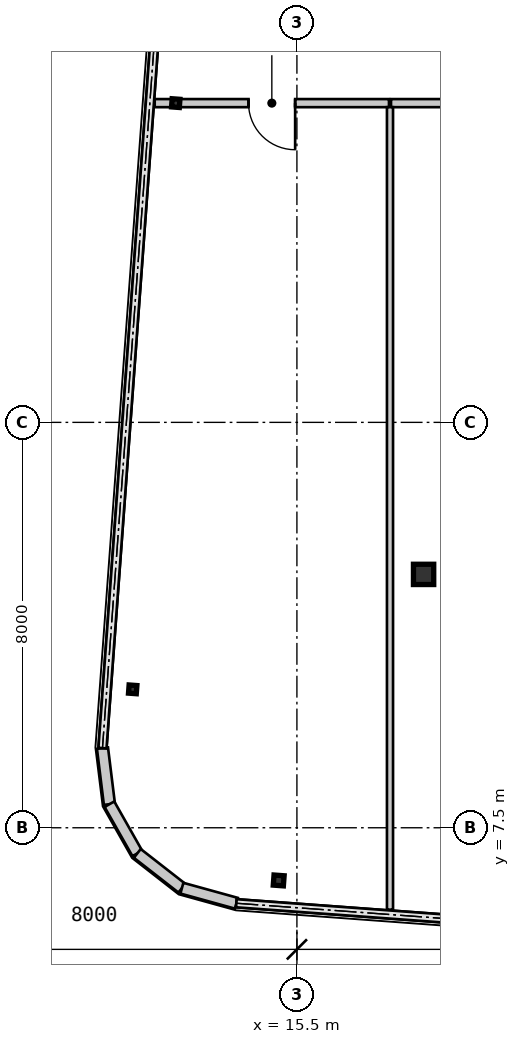
"""IFC4 building model, lengths in metres.
Left out: names, types, materials, properties, quantities, classifications, styles, units other than length and angle.
Written with IfcOpenShell. Run it as: python <this file> out.ifc"""

import sys

from ifc_helpers import new_model, si_unit, direction, frame, frame_2d, origin, origin_2d, place, context, subcontext, project, spatial, rectangle, hollow_rectangle, i_section, extrude, source, transform, mapped, element, fill, save


model = new_model("IFC4")
c1 = context("Model", 3, precision=1e-05, world=origin(), true_north=direction((0.0, 1.0)))
c2 = subcontext(c1, "Body", "Model", "MODEL_VIEW")
j1 = project(units=[si_unit("LENGTHUNIT", "METRE"), si_unit("PLANEANGLEUNIT", "RADIAN")], contexts=[c1])
p1 = place(None, origin())
s1 = spatial("IfcSite", under=j1, at=p1, CompositionType="ELEMENT")
p2 = place(p1, origin())
s2 = spatial("IfcBuilding", under=s1, at=p2, CompositionType="ELEMENT")
p3 = place(p2, frame((0.0, 0.0, 249.2)))
s3 = spatial("IfcBuildingStorey", under=s2, at=p3, CompositionType="ELEMENT", Elevation=249.2)
m1 = source(origin(), c2, "Body", "SweptSolid", [
    extrude(hollow_rectangle(XDim=0.4, YDim=0.4, WallThickness=0.016, at=origin_2d()), origin(), (0.0, 0.0, 1.0), 3.85),
])
p4 = place(p3, frame((18.0, 12.5, 0.0), z_axis=(0.0, 0.0, 1.0), x_axis=(1.0, 0.0, 0.0)))
e1 = element("IfcColumn", 1, at=p4, inside=s3, PredefinedType="COLUMN", context=c2, shape_type="MappedRepresentation", body=[
    mapped(m1, transform((0.0, 0.0, 0.0), scale=1.0)),
])
m2 = source(origin(), c2, "Body", "SweptSolid", [
    extrude(hollow_rectangle(XDim=0.2, YDim=0.2, WallThickness=0.009, at=origin_2d()), origin(), (0.0, 0.0, 1.0), 3.85),
])
p5 = place(p3, frame((15.141, 6.46, 0.0), z_axis=(0.0, 0.0, 1.0), x_axis=(0.997314477224, -0.073238197128, 0.0)))
e2 = element("IfcColumn", 2, at=p5, inside=s3, PredefinedType="COLUMN", context=c2, shape_type="MappedRepresentation", body=[
    mapped(m2, transform((0.0, 0.0, 0.0), scale=1.0)),
])
m3 = source(origin(), c2, "Body", "SweptSolid", [
    extrude(i_section(OverallWidth=0.154, OverallDepth=0.162, WebThickness=0.008, FlangeThickness=0.011, at=origin_2d()), origin(), (0.0, 0.0, 1.0), 3.85),
])
for number, where, z_axis, x_axis in (
    (3, (12.259, 10.231, 0.0), (0.0, 0.0, 1.0), (0.997, -0.073, 0.0)),
    (4, (13.109, 21.8, 0.0), (0.0, 0.0, 1.0), (0.997, -0.073, 0.0)),
):
    element("IfcColumn", number, at=place(p3, frame(where, z_axis=z_axis, x_axis=x_axis)), inside=s3, PredefinedType="COLUMN", context=c2, shape_type="MappedRepresentation", body=[
        mapped(m3, transform((0.0, 0.0, 0.0), scale=1.0)),
    ])
m4 = source(origin(), c2, "Body", "SweptSolid", [
    extrude(rectangle(XDim=1.116, YDim=0.22, at=frame_2d((0.558, 0.0))), origin(), (0.0, 0.0, 1.0), 3.57),
])
for number, where, z_axis, x_axis in (
    (5, (11.663, 9.072, 0.0), (0.0, 0.0, 1.0), (0.123, -0.992, 0.0)),
    (6, (11.8, 7.965, 0.0), (0.0, 0.0, 1.0), (0.493, -0.87, 0.0)),
    (7, (12.35, 6.994, 0.0), (0.0, 0.0, 1.0), (0.789, -0.615, 0.0)),
):
    element("IfcWall", number, at=place(p3, frame(where, z_axis=z_axis, x_axis=x_axis)), inside=s3, PredefinedType="SOLIDWALL", context=c2, shape_type="MappedRepresentation", body=[
        mapped(m4, transform((0.0, 0.0, 0.0), scale=1.0)),
    ])
m5 = source(origin(), c2, "Body", "SweptSolid", [
    extrude(rectangle(XDim=1.116, YDim=0.22, at=frame_2d((0.558, 0.0))), origin(), (0.0, 0.0, 1.0), 3.57),
])
p6 = place(p3, frame((13.23, 6.307, 0.0), z_axis=(0.0, 0.0, 1.0), x_axis=(0.963890028874, -0.266300605026, 0.0)))
e8 = element("IfcWall", 8, at=p6, inside=s3, PredefinedType="SOLIDWALL", context=c2, shape_type="MappedRepresentation", body=[
    mapped(m5, transform((0.0, 0.0, 0.0), scale=1.0)),
])
m6 = source(origin(), c2, "Body", "SweptSolid", [
    extrude(rectangle(XDim=4.624, YDim=0.16, at=frame_2d((2.312, 0.0))), origin(), (0.0, 0.0, 1.0), 3.57),
])
p7 = place(p3, frame((17.317, 21.8, 0.0), z_axis=(0.0, 0.0, 1.0), x_axis=(-1.0, 0.0, 0.0)))
e9 = element("IfcWall", 9, at=p7, inside=s3, PredefinedType="PARTITIONING", context=c2, shape_type="MappedRepresentation", body=[
    mapped(m6, transform((0.0, 0.0, 0.0), scale=1.0)),
])
m7 = source(origin(), c2, "Body", "SweptSolid", [
    extrude(rectangle(XDim=0.92, YDim=2.1, at=frame_2d((0.46, 1.05))), frame((0.0, 0.09, 0.0), z_axis=(0.0, -1.0, 0.0), x_axis=(1.0, 0.0, 0.0)), (0.0, 0.0, 1.0), 0.18),
])
p8 = place(p7, frame((1.852, 0.0, 0.0)))
e10 = element("IfcOpeningElement", 10, at=p8, cuts=e9, PredefinedType="OPENING", context=c2, shape_type="MappedRepresentation", body=[
    mapped(m7, transform((0.0, 0.0, 0.0), scale=1.0)),
])
m8 = source(origin(), c2, "Body", "SweptSolid", [
    extrude(rectangle(XDim=2.823, YDim=0.16, at=frame_2d((1.411, 0.0))), origin(), (0.0, 0.0, 1.0), 3.57),
])
p9 = place(p3, frame((20.18, 21.8, 0.0), z_axis=(0.0, 0.0, 1.0), x_axis=(-1.0, 0.0, 0.0)))
e11 = element("IfcWall", 11, at=p9, inside=s3, PredefinedType="PARTITIONING", context=c2, shape_type="MappedRepresentation", body=[
    mapped(m8, transform((0.0, 0.0, 0.0), scale=1.0)),
])
m9 = source(origin(), c2, "Body", "SweptSolid", [
    extrude(rectangle(XDim=15.836, YDim=0.12, at=frame_2d((7.918, 0.0))), origin(), (0.0, 0.0, 1.0), 3.57),
])
p10 = place(p3, frame((17.337, 21.72, 0.0), z_axis=(0.0, 0.0, 1.0), x_axis=(0.0, -1.0, 0.0)))
e12 = element("IfcWall", 12, at=p10, inside=s3, PredefinedType="PARTITIONING", context=c2, shape_type="MappedRepresentation", body=[
    mapped(m9, transform((0.0, 0.0, 0.0), scale=1.0)),
])
m10 = source(origin(), c2, "Body", "SweptSolid", [
    extrude(rectangle(XDim=0.92, YDim=2.1, at=frame_2d((0.46, 1.05))), frame((0.0, 0.025, 0.0), z_axis=(0.0, -1.0, 0.0), x_axis=(1.0, 0.0, 0.0)), (0.0, 0.0, 1.0), 0.05),
])
p11 = place(p8, origin())
e13 = element("IfcDoor", 13, at=p11, inside=s3, OperationType="SINGLE_SWING_LEFT", PredefinedType="DOOR", context=c2, shape_type="MappedRepresentation", body=[
    mapped(m10, transform((0.0, 0.0, 0.0), scale=1.0)),
])
fill(e10, e13)
save(model, sys.argv[1])
